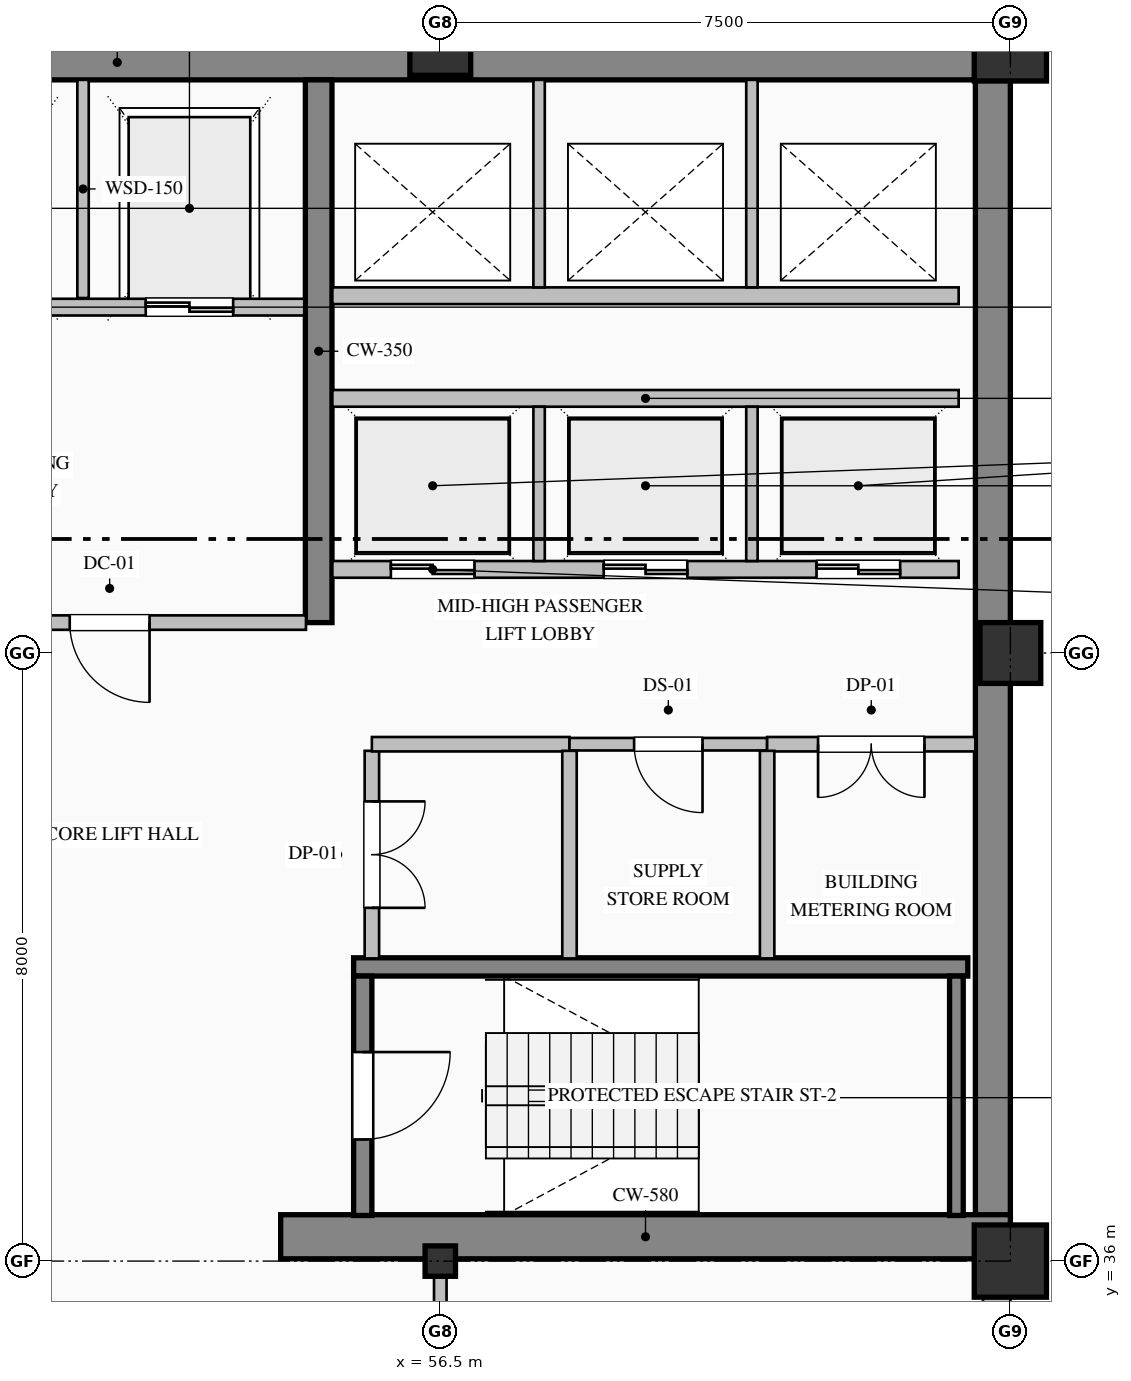
"""IFC4 building model, lengths in metres.
Left out: names, types, materials, properties, quantities, classifications, styles, units other than length and angle.
Written with IfcOpenShell. Run it as: python <this file> out.ifc"""

import sys

from ifc_helpers import new_model, si_unit, direction, frame, frame_2d, origin, origin_2d, place, context, subcontext, project, spatial, rectangle, hollow_rectangle, i_section, extrude, element, fill, save


model = new_model("IFC4")
c1 = context("Model", 3, precision=1e-05, world=origin(), true_north=direction((0.0, 1.0)))
c2 = subcontext(c1, "Body", "Model", "MODEL_VIEW")
j1 = project(units=[si_unit("LENGTHUNIT", "METRE"), si_unit("PLANEANGLEUNIT", "RADIAN")], contexts=[c1])
p1 = place(None, origin())
s1 = spatial("IfcSite", under=j1, at=p1, CompositionType="ELEMENT")
p2 = place(p1, origin())
s2 = spatial("IfcBuilding", under=s1, at=p2, CompositionType="ELEMENT")
p3 = place(p2, frame((0.0, 0.0, 225.8)))
s3 = spatial("IfcBuildingStorey", under=s2, at=p3, CompositionType="ELEMENT", Elevation=225.8)
p4 = place(p3, frame((40.5, 51.77, 0.0), z_axis=(0.0, 0.0, 1.0), x_axis=(1.0, 0.0, 0.0)))
e1 = element("IfcWall", 1, at=p4, inside=s3, PredefinedType="SHEAR", context=c2, shape_type="SweptSolid", body=[
    extrude(rectangle(XDim=23.5, YDim=0.46, at=frame_2d((11.75, 0.0))), origin(), (0.0, 0.0, 1.0), 3.775),
])
p5 = place(p3, frame((63.77, 36.32, 0.0), z_axis=(0.0, 0.0, 1.0), x_axis=(0.0, 1.0, 0.0)))
e2 = element("IfcWall", 2, at=p5, inside=s3, PredefinedType="SHEAR", context=c2, shape_type="SweptSolid", body=[
    extrude(rectangle(XDim=15.22, YDim=0.46, at=frame_2d((7.61, 0.0))), origin(), (0.0, 0.0, 1.0), 3.775),
])
p6 = place(p3, frame((54.4, 36.32, 0.0), z_axis=(0.0, 0.0, 1.0), x_axis=(1.0, 0.0, 0.0)))
e3 = element("IfcWall", 3, at=p6, inside=s3, PredefinedType="SHEAR", context=c2, shape_type="SweptSolid", body=[
    extrude(rectangle(XDim=9.6, YDim=0.58, at=frame_2d((4.8, 0.0))), origin(), (0.0, 0.0, 1.0), 4.0),
])
p7 = place(p3, frame((54.9, 44.4, 0.0), z_axis=(0.0, 0.0, 1.0), x_axis=(0.0, 1.0, 0.0)))
e4 = element("IfcWall", 4, at=p7, inside=s3, PredefinedType="SHEAR", context=c2, shape_type="SweptSolid", body=[
    extrude(rectangle(XDim=7.14, YDim=0.35, at=frame_2d((3.57, 0.0))), origin(), (0.0, 0.0, 1.0), 3.775),
])
p8 = place(p3, frame((56.5, 36.0, 0.0), z_axis=(0.0, 0.0, 1.0), x_axis=(1.0, 0.0, 0.0)))
e5 = element("IfcColumn", 5, at=p8, inside=s3, PredefinedType="COLUMN", context=c2, shape_type="SweptSolid", body=[
    extrude(i_section(OverallWidth=0.4, OverallDepth=0.4, WebThickness=0.013, FlangeThickness=0.021, FilletRadius=0.022, at=origin_2d()), origin(), (0.0, 0.0, 1.0), 4.0),
])
p9 = place(p3, frame((56.5, 52.0, 0.0), z_axis=(0.0, 0.0, 1.0), x_axis=(1.0, 0.0, 0.0)))
e6 = element("IfcColumn", 6, at=p9, inside=s3, PredefinedType="COLUMN", context=c2, shape_type="SweptSolid", body=[
    extrude(hollow_rectangle(XDim=0.8, YDim=0.8, WallThickness=0.032, at=origin_2d()), origin(), (0.0, 0.0, 1.0), 4.0),
])
p10 = place(p3, frame((64.0, 36.0, 0.0), z_axis=(0.0, 0.0, 1.0), x_axis=(1.0, 0.0, 0.0)))
e7 = element("IfcColumn", 7, at=p10, inside=s3, PredefinedType="COLUMN", context=c2, shape_type="SweptSolid", body=[
    extrude(hollow_rectangle(XDim=0.95, YDim=0.95, WallThickness=0.036, at=origin_2d()), origin(), (0.0, 0.0, 1.0), 4.0),
])
p11 = place(p3, frame((64.0, 44.0, 0.0), z_axis=(0.0, 0.0, 1.0), x_axis=(1.0, 0.0, 0.0)))
e8 = element("IfcColumn", 8, at=p11, inside=s3, PredefinedType="COLUMN", context=c2, shape_type="SweptSolid", body=[
    extrude(hollow_rectangle(XDim=0.8, YDim=0.8, WallThickness=0.032, at=origin_2d()), origin(), (0.0, 0.0, 1.0), 4.0),
])
p12 = place(p3, frame((64.0, 52.0, 0.0), z_axis=(0.0, 0.0, 1.0), x_axis=(1.0, 0.0, 0.0)))
e9 = element("IfcColumn", 9, at=p12, inside=s3, PredefinedType="COLUMN", context=c2, shape_type="SweptSolid", body=[
    extrude(hollow_rectangle(XDim=0.95, YDim=0.95, WallThickness=0.036, at=origin_2d()), origin(), (0.0, 0.0, 1.0), 4.0),
])
p13 = place(p3, frame((63.82, 36.05, 0.0), z_axis=(0.0, 0.0, 1.0), x_axis=(0.0, -1.0, 0.0)))
e10 = element("IfcWall", 10, at=p13, inside=s3, PredefinedType="SOLIDWALL", context=c2, shape_type="SweptSolid", body=[
    extrude(rectangle(XDim=19.55, YDim=0.36, at=frame_2d((9.775, 0.0))), origin(), (0.0, 0.0, 1.0), 3.325),
])
p14 = place(p13, frame((3.0, 0.0, 0.9)))
e11 = element("IfcOpeningElement", 11, at=p14, cuts=e10, PredefinedType="OPENING", context=c2, shape_type="SweptSolid", body=[
    extrude(rectangle(XDim=1.2, YDim=1.85, at=frame_2d((0.6, 0.925))), frame((0.0, 0.19, 0.0), z_axis=(0.0, -1.0, 0.0), x_axis=(1.0, 0.0, 0.0)), (0.0, 0.0, 1.0), 0.38),
])
p15 = place(p13, frame((10.05, 0.0, 0.7)))
e12 = element("IfcOpeningElement", 12, at=p15, cuts=e10, PredefinedType="OPENING", context=c2, shape_type="SweptSolid", body=[
    extrude(rectangle(XDim=1.5, YDim=2.4, at=frame_2d((0.75, 1.2))), frame((0.0, 0.19, 0.0), z_axis=(0.0, -1.0, 0.0), x_axis=(1.0, 0.0, 0.0)), (0.0, 0.0, 1.0), 0.38),
])
p16 = place(p13, frame((13.8, 0.0, 0.9)))
e13 = element("IfcOpeningElement", 13, at=p16, cuts=e10, PredefinedType="OPENING", context=c2, shape_type="SweptSolid", body=[
    extrude(rectangle(XDim=1.2, YDim=1.85, at=frame_2d((0.6, 0.925))), frame((0.0, 0.19, 0.0), z_axis=(0.0, -1.0, 0.0), x_axis=(1.0, 0.0, 0.0)), (0.0, 0.0, 1.0), 0.38),
])
p17 = place(p3, frame((55.36, 39.87, 0.0), z_axis=(0.0, 0.0, 1.0), x_axis=(1.0, 0.0, 0.0)))
e14 = element("IfcWall", 14, at=p17, inside=s3, PredefinedType="SOLIDWALL", context=c2, shape_type="SweptSolid", body=[
    extrude(rectangle(XDim=8.08, YDim=0.24, at=frame_2d((4.04, 0.0))), origin(), (0.0, 0.0, 1.0), 4.0),
])
p18 = place(p3, frame((55.48, 39.75, 0.0), z_axis=(0.0, 0.0, 1.0), x_axis=(0.0, -1.0, 0.0)))
e15 = element("IfcWall", 15, at=p18, inside=s3, PredefinedType="SOLIDWALL", context=c2, shape_type="SweptSolid", body=[
    extrude(rectangle(XDim=3.15, YDim=0.24, at=frame_2d((1.575, 0.0))), origin(), (0.0, 0.0, 1.0), 4.0),
])
p19 = place(p18, frame((1.0, 0.0, 0.0)))
e16 = element("IfcOpeningElement", 16, at=p19, cuts=e15, PredefinedType="OPENING", context=c2, shape_type="SweptSolid", body=[
    extrude(rectangle(XDim=1.15, YDim=2.2, at=frame_2d((0.575, 1.1))), frame((0.0, 0.13, 0.0), z_axis=(0.0, -1.0, 0.0), x_axis=(1.0, 0.0, 0.0)), (0.0, 0.0, 1.0), 0.26),
])
p20 = place(p3, frame((63.29, 36.6, 0.0), z_axis=(0.0, 0.0, 1.0), x_axis=(0.0, 1.0, 0.0)))
e17 = element("IfcWall", 17, at=p20, inside=s3, PredefinedType="SOLIDWALL", context=c2, shape_type="SweptSolid", body=[
    extrude(rectangle(XDim=3.15, YDim=0.18, at=frame_2d((1.575, 0.0))), origin(), (0.0, 0.0, 1.0), 4.0),
])
p21 = place(p3, frame((54.71, 48.55, 0.0), z_axis=(0.0, 0.0, 1.0), x_axis=(-1.0, 0.0, 0.0)))
e18 = element("IfcWall", 18, at=p21, inside=s3, PredefinedType="PARTITIONING", context=c2, shape_type="SweptSolid", body=[
    extrude(rectangle(XDim=5.12, YDim=0.22, at=frame_2d((2.56, 0.0))), origin(), (0.0, 0.0, 1.0), 3.775),
])
p22 = place(p21, frame((3.735, 0.0, 0.0)))
e19 = element("IfcOpeningElement", 19, at=p22, cuts=e18, PredefinedType="OPENING", context=c2, shape_type="SweptSolid", body=[
    extrude(rectangle(XDim=1.15, YDim=2.2, at=frame_2d((0.575, 1.1))), frame((0.0, 0.12, 0.0), z_axis=(0.0, -1.0, 0.0), x_axis=(1.0, 0.0, 0.0)), (0.0, 0.0, 1.0), 0.24),
])
p23 = place(p21, frame((0.935, 0.0, 0.0)))
e20 = element("IfcOpeningElement", 20, at=p23, cuts=e18, PredefinedType="OPENING", context=c2, shape_type="SweptSolid", body=[
    extrude(rectangle(XDim=1.15, YDim=2.2, at=frame_2d((0.575, 1.1))), frame((0.0, 0.12, 0.0), z_axis=(0.0, -1.0, 0.0), x_axis=(1.0, 0.0, 0.0)), (0.0, 0.0, 1.0), 0.24),
])
p24 = place(p3, frame((51.8, 48.67, 0.0), z_axis=(0.0, 0.0, 1.0), x_axis=(0.0, 1.0, 0.0)))
e21 = element("IfcWall", 21, at=p24, inside=s3, PredefinedType="PARTITIONING", context=c2, shape_type="SweptSolid", body=[
    extrude(rectangle(XDim=2.87, YDim=0.15, at=frame_2d((1.435, 0.0))), origin(), (0.0, 0.0, 1.0), 3.775),
])
p25 = place(p3, frame((63.32, 45.1, 0.0), z_axis=(0.0, 0.0, 1.0), x_axis=(-1.0, 0.0, 0.0)))
e22 = element("IfcWall", 22, at=p25, inside=s3, PredefinedType="PARTITIONING", context=c2, shape_type="SweptSolid", body=[
    extrude(rectangle(XDim=8.24, YDim=0.22, at=frame_2d((4.12, 0.0))), origin(), (0.0, 0.0, 1.0), 3.775),
])
p26 = place(p25, frame((6.37, 0.0, 0.0)))
e23 = element("IfcOpeningElement", 23, at=p26, cuts=e22, PredefinedType="OPENING", context=c2, shape_type="SweptSolid", body=[
    extrude(rectangle(XDim=1.1, YDim=2.2, at=frame_2d((0.55, 1.1))), frame((0.0, 0.12, 0.0), z_axis=(0.0, -1.0, 0.0), x_axis=(1.0, 0.0, 0.0)), (0.0, 0.0, 1.0), 0.24),
])
p27 = place(p25, frame((3.57, 0.0, 0.0)))
e24 = element("IfcOpeningElement", 24, at=p27, cuts=e22, PredefinedType="OPENING", context=c2, shape_type="SweptSolid", body=[
    extrude(rectangle(XDim=1.1, YDim=2.2, at=frame_2d((0.55, 1.1))), frame((0.0, 0.12, 0.0), z_axis=(0.0, -1.0, 0.0), x_axis=(1.0, 0.0, 0.0)), (0.0, 0.0, 1.0), 0.24),
])
p28 = place(p25, frame((0.77, 0.0, 0.0)))
e25 = element("IfcOpeningElement", 25, at=p28, cuts=e22, PredefinedType="OPENING", context=c2, shape_type="SweptSolid", body=[
    extrude(rectangle(XDim=1.1, YDim=2.2, at=frame_2d((0.55, 1.1))), frame((0.0, 0.12, 0.0), z_axis=(0.0, -1.0, 0.0), x_axis=(1.0, 0.0, 0.0)), (0.0, 0.0, 1.0), 0.24),
])
p29 = place(p3, frame((55.08, 47.35, 0.0), z_axis=(0.0, 0.0, 1.0), x_axis=(1.0, 0.0, 0.0)))
e26 = element("IfcWall", 26, at=p29, inside=s3, PredefinedType="PARTITIONING", context=c2, shape_type="SweptSolid", body=[
    extrude(rectangle(XDim=8.24, YDim=0.22, at=frame_2d((4.12, 0.0))), origin(), (0.0, 0.0, 1.0), 3.775),
])
for number, where, z_axis, x_axis in (
    (27, (57.8, 45.21, 0.0), (0.0, 0.0, 1.0), (0.0, 1.0, 0.0)),
    (28, (60.6, 45.21, 0.0), (0.0, 0.0, 1.0), (0.0, 1.0, 0.0)),
):
    element("IfcWall", number, at=place(p3, frame(where, z_axis=z_axis, x_axis=x_axis)), inside=s3, PredefinedType="PARTITIONING", context=c2, shape_type="SweptSolid", body=[
        extrude(rectangle(XDim=2.03, YDim=0.15, at=frame_2d((1.015, 0.0))), origin(), (0.0, 0.0, 1.0), 3.775),
    ])
p30 = place(p3, frame((63.32, 48.7, 0.0), z_axis=(0.0, 0.0, 1.0), x_axis=(-1.0, 0.0, 0.0)))
e29 = element("IfcWall", 29, at=p30, inside=s3, PredefinedType="PARTITIONING", context=c2, shape_type="SweptSolid", body=[
    extrude(rectangle(XDim=8.24, YDim=0.22, at=frame_2d((4.12, 0.0))), origin(), (0.0, 0.0, 1.0), 3.775),
])
for number, where, z_axis, x_axis in (
    (30, (57.8, 48.81, 0.0), (0.0, 0.0, 1.0), (0.0, 1.0, 0.0)),
    (31, (60.6, 48.81, 0.0), (0.0, 0.0, 1.0), (0.0, 1.0, 0.0)),
):
    element("IfcWall", number, at=place(p3, frame(where, z_axis=z_axis, x_axis=x_axis)), inside=s3, PredefinedType="PARTITIONING", context=c2, shape_type="SweptSolid", body=[
        extrude(rectangle(XDim=2.73, YDim=0.15, at=frame_2d((1.365, 0.0))), origin(), (0.0, 0.0, 1.0), 3.775),
    ])
p31 = place(p3, frame((54.733, 44.4, 0.0), z_axis=(0.0, 0.0, 1.0), x_axis=(-1.0, 0.0, 0.0)))
e32 = element("IfcWall", 32, at=p31, inside=s3, PredefinedType="PARTITIONING", context=c2, shape_type="SweptSolid", body=[
    extrude(rectangle(XDim=5.166, YDim=0.19, at=frame_2d((2.583, 0.0))), origin(), (0.0, 0.0, 1.0), 3.775),
])
p32 = place(p31, frame((2.058, 0.0, 0.0)))
e33 = element("IfcOpeningElement", 33, at=p32, cuts=e32, PredefinedType="OPENING", context=c2, shape_type="SweptSolid", body=[
    extrude(rectangle(XDim=1.05, YDim=2.15, at=frame_2d((0.525, 1.075))), frame((0.0, 0.105, 0.0), z_axis=(0.0, -1.0, 0.0), x_axis=(1.0, 0.0, 0.0)), (0.0, 0.0, 1.0), 0.21),
])
p33 = place(p3, frame((55.6, 42.713, 0.0), z_axis=(0.0, 0.0, 1.0), x_axis=(0.0, -1.0, 0.0)))
e34 = element("IfcWall", 34, at=p33, inside=s3, PredefinedType="PARTITIONING", context=c2, shape_type="SweptSolid", body=[
    extrude(rectangle(XDim=2.731, YDim=0.19, at=frame_2d((1.365, 0.0))), origin(), (0.0, 0.0, 1.0), 3.775),
])
p34 = place(p33, frame((0.666, 0.0, 0.0)))
e35 = element("IfcOpeningElement", 35, at=p34, cuts=e34, PredefinedType="OPENING", context=c2, shape_type="SweptSolid", body=[
    extrude(rectangle(XDim=1.4, YDim=2.25, at=frame_2d((0.7, 1.125))), frame((0.0, 0.105, 0.0), z_axis=(0.0, -1.0, 0.0), x_axis=(1.0, 0.0, 0.0)), (0.0, 0.0, 1.0), 0.21),
])
p35 = place(p3, frame((58.2, 42.8, 0.0), z_axis=(0.0, 0.0, 1.0), x_axis=(-1.0, 0.0, 0.0)))
e36 = element("IfcWall", 36, at=p35, inside=s3, PredefinedType="PARTITIONING", context=c2, shape_type="SweptSolid", body=[
    extrude(rectangle(XDim=2.6, YDim=0.19, at=frame_2d((1.3, 0.0))), origin(), (0.0, 0.0, 1.0), 3.775),
])
p36 = place(p3, frame((60.8, 42.8, 0.0), z_axis=(0.0, 0.0, 1.0), x_axis=(-1.0, 0.0, 0.0)))
e37 = element("IfcWall", 37, at=p36, inside=s3, PredefinedType="PARTITIONING", context=c2, shape_type="SweptSolid", body=[
    extrude(rectangle(XDim=2.6, YDim=0.165, at=frame_2d((1.3, 0.0))), origin(), (0.0, 0.0, 1.0), 3.775),
])
p37 = place(p36, frame((0.85, 0.0, 0.0)))
e38 = element("IfcOpeningElement", 38, at=p37, cuts=e37, PredefinedType="OPENING", context=c2, shape_type="SweptSolid", body=[
    extrude(rectangle(XDim=0.9, YDim=2.15, at=frame_2d((0.45, 1.075))), frame((0.0, 0.093, 0.0), z_axis=(0.0, -1.0, 0.0), x_axis=(1.0, 0.0, 0.0)), (0.0, 0.0, 1.0), 0.185),
])
p38 = place(p3, frame((63.54, 42.8, 0.0), z_axis=(0.0, 0.0, 1.0), x_axis=(-1.0, 0.0, 0.0)))
e39 = element("IfcWall", 39, at=p38, inside=s3, PredefinedType="PARTITIONING", context=c2, shape_type="SweptSolid", body=[
    extrude(rectangle(XDim=2.74, YDim=0.19, at=frame_2d((1.37, 0.0))), origin(), (0.0, 0.0, 1.0), 3.775),
])
p39 = place(p38, frame((0.67, 0.0, 0.0)))
e40 = element("IfcOpeningElement", 40, at=p39, cuts=e39, PredefinedType="OPENING", context=c2, shape_type="SweptSolid", body=[
    extrude(rectangle(XDim=1.4, YDim=2.25, at=frame_2d((0.7, 1.125))), frame((0.0, 0.105, 0.0), z_axis=(0.0, -1.0, 0.0), x_axis=(1.0, 0.0, 0.0)), (0.0, 0.0, 1.0), 0.21),
])
for number, where, z_axis, x_axis in (
    (41, (58.2, 42.713, 0.0), (0.0, 0.0, 1.0), (0.0, -1.0, 0.0)),
    (42, (60.8, 42.713, 0.0), (0.0, 0.0, 1.0), (0.0, -1.0, 0.0)),
):
    element("IfcWall", number, at=place(p3, frame(where, z_axis=z_axis, x_axis=x_axis)), inside=s3, PredefinedType="PARTITIONING", context=c2, shape_type="SweptSolid", body=[
        extrude(rectangle(XDim=2.731, YDim=0.19, at=frame_2d((1.365, 0.0))), origin(), (0.0, 0.0, 1.0), 3.775),
    ])
p40 = place(p3, frame((56.5, 36.0, 0.0), z_axis=(0.0, 0.0, 1.0), x_axis=(0.0, -1.0, 0.0)))
e43 = element("IfcWall", 43, at=p40, inside=s3, PredefinedType="PARTITIONING", context=c2, shape_type="SweptSolid", body=[
    extrude(rectangle(XDim=5.525, YDim=0.165, at=frame_2d((2.763, 0.0))), origin(), (0.0, 0.0, 1.0), 3.179),
])
p41 = place(p19, origin())
e44 = element("IfcDoor", 44, at=p41, inside=s3, OperationType="SINGLE_SWING_LEFT", PredefinedType="DOOR", context=c2, shape_type="SweptSolid", body=[
    extrude(rectangle(XDim=1.15, YDim=2.2, at=frame_2d((0.575, 1.1))), frame((0.0, 0.025, 0.0), z_axis=(0.0, -1.0, 0.0), x_axis=(1.0, 0.0, 0.0)), (0.0, 0.0, 1.0), 0.05),
])
fill(e16, e44)
p42 = place(p23, origin())
e45 = element("IfcDoor", 45, at=p42, inside=s3, OperationType="DOUBLE_DOOR_SLIDING", PredefinedType="DOOR", context=c2, shape_type="SweptSolid", body=[
    extrude(rectangle(XDim=1.15, YDim=2.2, at=frame_2d((0.575, 1.1))), frame((0.0, 0.025, 0.0), z_axis=(0.0, -1.0, 0.0), x_axis=(1.0, 0.0, 0.0)), (0.0, 0.0, 1.0), 0.05),
])
fill(e20, e45)
p43 = place(p26, origin())
e46 = element("IfcDoor", 46, at=p43, inside=s3, OperationType="DOUBLE_DOOR_SLIDING", PredefinedType="DOOR", context=c2, shape_type="SweptSolid", body=[
    extrude(rectangle(XDim=1.1, YDim=2.2, at=frame_2d((0.55, 1.1))), frame((0.0, 0.025, 0.0), z_axis=(0.0, -1.0, 0.0), x_axis=(1.0, 0.0, 0.0)), (0.0, 0.0, 1.0), 0.05),
])
fill(e23, e46)
p44 = place(p27, origin())
e47 = element("IfcDoor", 47, at=p44, inside=s3, OperationType="DOUBLE_DOOR_SLIDING", PredefinedType="DOOR", context=c2, shape_type="SweptSolid", body=[
    extrude(rectangle(XDim=1.1, YDim=2.2, at=frame_2d((0.55, 1.1))), frame((0.0, 0.025, 0.0), z_axis=(0.0, -1.0, 0.0), x_axis=(1.0, 0.0, 0.0)), (0.0, 0.0, 1.0), 0.05),
])
fill(e24, e47)
p45 = place(p28, origin())
e48 = element("IfcDoor", 48, at=p45, inside=s3, OperationType="DOUBLE_DOOR_SLIDING", PredefinedType="DOOR", context=c2, shape_type="SweptSolid", body=[
    extrude(rectangle(XDim=1.1, YDim=2.2, at=frame_2d((0.55, 1.1))), frame((0.0, 0.025, 0.0), z_axis=(0.0, -1.0, 0.0), x_axis=(1.0, 0.0, 0.0)), (0.0, 0.0, 1.0), 0.05),
])
fill(e25, e48)
p46 = place(p32, origin())
e49 = element("IfcDoor", 49, at=p46, inside=s3, OperationType="SINGLE_SWING_LEFT", PredefinedType="DOOR", context=c2, shape_type="SweptSolid", body=[
    extrude(rectangle(XDim=1.05, YDim=2.15, at=frame_2d((0.525, 1.075))), frame((0.0, 0.025, 0.0), z_axis=(0.0, -1.0, 0.0), x_axis=(1.0, 0.0, 0.0)), (0.0, 0.0, 1.0), 0.05),
])
fill(e33, e49)
p47 = place(p34, origin())
e50 = element("IfcDoor", 50, at=p47, inside=s3, OperationType="DOUBLE_DOOR_SINGLE_SWING", PredefinedType="DOOR", context=c2, shape_type="SweptSolid", body=[
    extrude(rectangle(XDim=1.4, YDim=2.25, at=frame_2d((0.7, 1.125))), frame((0.0, 0.025, 0.0), z_axis=(0.0, -1.0, 0.0), x_axis=(1.0, 0.0, 0.0)), (0.0, 0.0, 1.0), 0.05),
])
fill(e35, e50)
p48 = place(p37, origin())
e51 = element("IfcDoor", 51, at=p48, inside=s3, OperationType="SINGLE_SWING_LEFT", PredefinedType="DOOR", context=c2, shape_type="SweptSolid", body=[
    extrude(rectangle(XDim=0.9, YDim=2.15, at=frame_2d((0.45, 1.075))), frame((0.0, 0.025, 0.0), z_axis=(0.0, -1.0, 0.0), x_axis=(1.0, 0.0, 0.0)), (0.0, 0.0, 1.0), 0.05),
])
fill(e38, e51)
p49 = place(p39, origin())
e52 = element("IfcDoor", 52, at=p49, inside=s3, OperationType="DOUBLE_DOOR_SINGLE_SWING", PredefinedType="DOOR", context=c2, shape_type="SweptSolid", body=[
    extrude(rectangle(XDim=1.4, YDim=2.25, at=frame_2d((0.7, 1.125))), frame((0.0, 0.025, 0.0), z_axis=(0.0, -1.0, 0.0), x_axis=(1.0, 0.0, 0.0)), (0.0, 0.0, 1.0), 0.05),
])
fill(e40, e52)
save(model, sys.argv[1])
